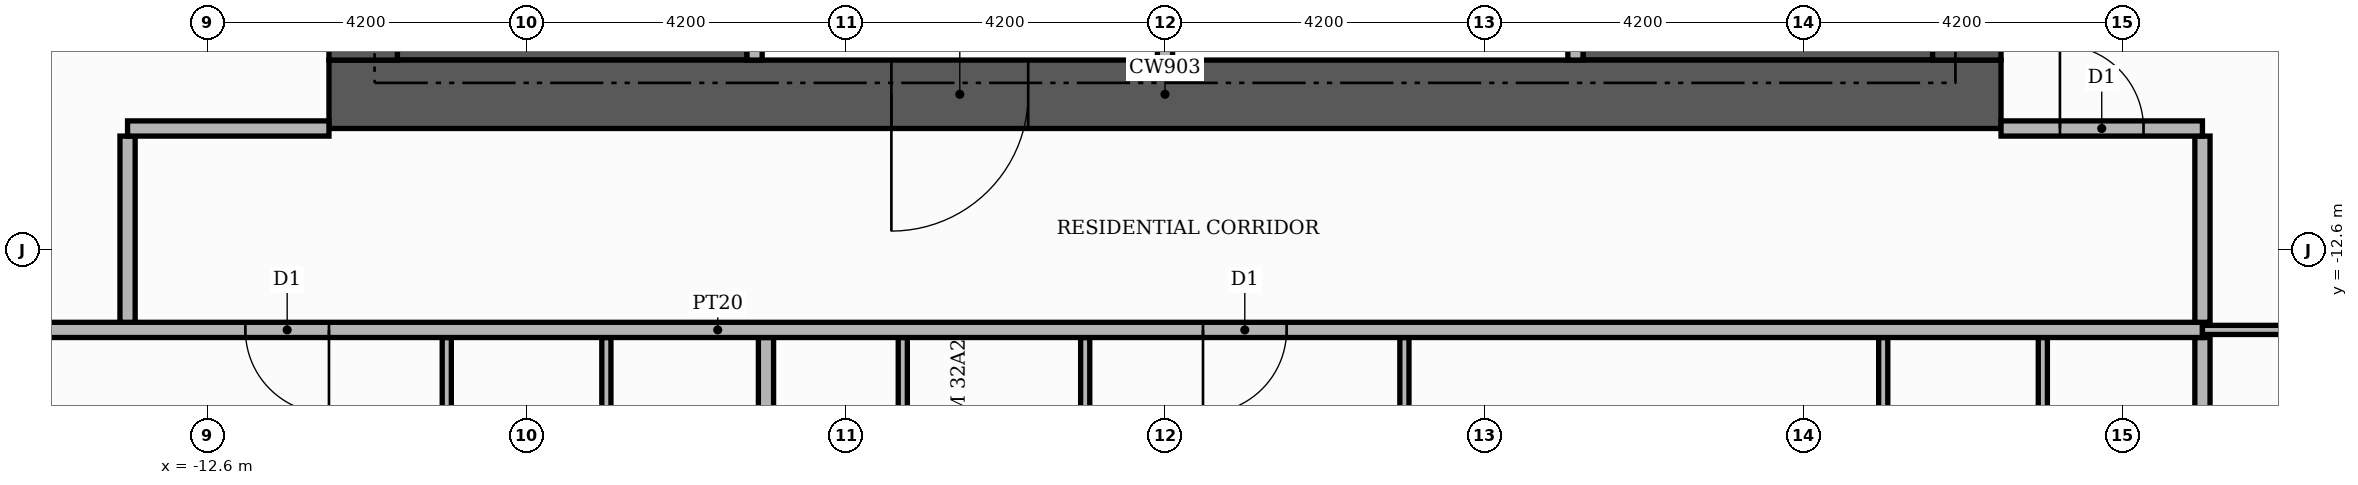
"""IFC4 building model, lengths in metres.
Left out: names, types, materials, properties, quantities, classifications, styles, units other than length and angle.
Written with IfcOpenShell. Run it as: python <this file> out.ifc"""

import sys

from ifc_helpers import new_model, si_unit, direction, frame, frame_2d, origin, place, context, subcontext, project, spatial, rectangle, extrude, element, fill, save


model = new_model("IFC4")
c1 = context("Model", 3, precision=1e-05, world=origin(), true_north=direction((0.0, 1.0)))
c2 = subcontext(c1, "Body", "Model", "MODEL_VIEW")
j1 = project(units=[si_unit("LENGTHUNIT", "METRE"), si_unit("PLANEANGLEUNIT", "RADIAN")], contexts=[c1])
p1 = place(None, origin())
s1 = spatial("IfcSite", under=j1, at=p1, CompositionType="ELEMENT")
p2 = place(p1, origin())
s2 = spatial("IfcBuilding", under=s1, at=p2, CompositionType="ELEMENT")
p3 = place(p2, frame((0.0, 0.0, 137.7)))
s3 = spatial("IfcBuildingStorey", under=s2, at=p3, CompositionType="ELEMENT", Elevation=137.7)
for number, where, z_axis, x_axis in (
    (1, (-10.1, -9.15, 0.0), (0.0, 0.0, 1.0), (1.0, 0.0, 0.0)),
    (2, (5.5, -9.15, 0.0), (0.0, 0.0, 1.0), (1.0, 0.0, 0.0)),
):
    element("IfcWall", number, at=place(p3, frame(where, z_axis=z_axis, x_axis=x_axis)), inside=s3, PredefinedType="SHEAR", context=c2, shape_type="SweptSolid", body=[
        extrude(rectangle(XDim=4.6, YDim=1.9, at=frame_2d((2.3, 0.0))), origin(), (0.0, 0.0, 1.0), 3.48),
    ])
p4 = place(p3, frame((-11.0, -10.55, 0.0), z_axis=(0.0, 0.0, 1.0), x_axis=(1.0, 0.0, 0.0)))
e3 = element("IfcWall", 3, at=p4, inside=s3, PredefinedType="SHEAR", context=c2, shape_type="SweptSolid", body=[
    extrude(rectangle(XDim=22.0, YDim=0.9, at=frame_2d((11.0, 0.0))), origin(), (0.0, 0.0, 1.0), 3.48),
])
p5 = place(p4, frame((7.4, 0.0, 0.0)))
e4 = element("IfcOpeningElement", 4, at=p5, cuts=e3, PredefinedType="OPENING", context=c2, shape_type="SweptSolid", body=[
    extrude(rectangle(XDim=1.8, YDim=2.2, at=frame_2d((0.9, 1.1))), frame((0.0, 0.46, 0.0), z_axis=(0.0, -1.0, 0.0), x_axis=(1.0, 0.0, 0.0)), (0.0, 0.0, 1.0), 0.92),
])
for number, where, z_axis, x_axis in (
    (5, (-10.55, -10.1, 0.0), (0.0, 0.0, 1.0), (0.0, 1.0, 0.0)),
    (6, (10.55, -10.1, 0.0), (0.0, 0.0, 1.0), (0.0, 1.0, 0.0)),
):
    element("IfcWall", number, at=place(p3, frame(where, z_axis=z_axis, x_axis=x_axis)), inside=s3, PredefinedType="SHEAR", context=c2, shape_type="SweptSolid", body=[
        extrude(rectangle(XDim=20.2, YDim=0.9, at=frame_2d((10.1, 0.0))), origin(), (0.0, 0.0, 1.0), 3.48),
    ])
p6 = place(p3, frame((-5.4, -10.1, 0.0), z_axis=(0.0, 0.0, 1.0), x_axis=(0.0, 1.0, 0.0)))
e7 = element("IfcWall", 7, at=p6, inside=s3, PredefinedType="PARTITIONING", context=c2, shape_type="SweptSolid", body=[
    extrude(rectangle(XDim=4.6, YDim=0.2, at=frame_2d((2.3, 0.0))), origin(), (0.0, 0.0, 1.0), 3.48),
])
p7 = place(p6, frame((2.9, 0.0, 0.0)))
e8 = element("IfcOpeningElement", 8, at=p7, cuts=e7, PredefinedType="OPENING", context=c2, shape_type="SweptSolid", body=[
    extrude(rectangle(XDim=1.0, YDim=2.1, at=frame_2d((0.5, 1.05))), frame((0.0, 0.11, 0.0), z_axis=(0.0, -1.0, 0.0), x_axis=(1.0, 0.0, 0.0)), (0.0, 0.0, 1.0), 0.22),
])
p8 = place(p3, frame((0.0, -10.1, 0.0), z_axis=(0.0, 0.0, 1.0), x_axis=(0.0, 1.0, 0.0)))
e9 = element("IfcWall", 9, at=p8, inside=s3, PredefinedType="PARTITIONING", context=c2, shape_type="SweptSolid", body=[
    extrude(rectangle(XDim=2.2, YDim=0.2, at=frame_2d((1.1, 0.0))), origin(), (0.0, 0.0, 1.0), 3.48),
])
p9 = place(p3, frame((5.4, -10.1, 0.0), z_axis=(0.0, 0.0, 1.0), x_axis=(0.0, 1.0, 0.0)))
e10 = element("IfcWall", 10, at=p9, inside=s3, PredefinedType="PARTITIONING", context=c2, shape_type="SweptSolid", body=[
    extrude(rectangle(XDim=4.6, YDim=0.2, at=frame_2d((2.3, 0.0))), origin(), (0.0, 0.0, 1.0), 3.48),
])
p10 = place(p9, frame((2.9, 0.0, 0.0)))
e11 = element("IfcOpeningElement", 11, at=p10, cuts=e10, PredefinedType="OPENING", context=c2, shape_type="SweptSolid", body=[
    extrude(rectangle(XDim=1.0, YDim=2.1, at=frame_2d((0.5, 1.05))), frame((0.0, 0.11, 0.0), z_axis=(0.0, -1.0, 0.0), x_axis=(1.0, 0.0, 0.0)), (0.0, 0.0, 1.0), 0.22),
])
for number, where, z_axis, x_axis in (
    (12, (-5.25, -25.42, 0.0), (0.0, 0.0, 1.0), (0.0, 1.0, 0.0)),
    (13, (13.65, -25.42, 0.0), (0.0, 0.0, 1.0), (0.0, 1.0, 0.0)),
):
    element("IfcWall", number, at=place(p3, frame(where, z_axis=z_axis, x_axis=x_axis)), inside=s3, PredefinedType="PARTITIONING", context=c2, shape_type="SweptSolid", body=[
        extrude(rectangle(XDim=11.67, YDim=0.2, at=frame_2d((5.835, 0.0))), origin(), (0.0, 0.0, 1.0), 3.48),
    ])
p11 = place(p3, frame((-3.45, -18.56, 0.0), z_axis=(0.0, 0.0, 1.0), x_axis=(0.0, 1.0, 0.0)))
e14 = element("IfcWall", 14, at=p11, inside=s3, PredefinedType="PARTITIONING", context=c2, shape_type="SweptSolid", body=[
    extrude(rectangle(XDim=4.81, YDim=0.12, at=frame_2d((2.405, 0.0))), origin(), (0.0, 0.0, 1.0), 3.48),
])
p12 = place(p3, frame((-1.05, -18.56, 0.0), z_axis=(0.0, 0.0, 1.0), x_axis=(0.0, 1.0, 0.0)))
e15 = element("IfcWall", 15, at=p12, inside=s3, PredefinedType="PARTITIONING", context=c2, shape_type="SweptSolid", body=[
    extrude(rectangle(XDim=4.81, YDim=0.12, at=frame_2d((2.405, 0.0))), origin(), (0.0, 0.0, 1.0), 3.48),
])
p13 = place(p12, frame((1.975, 0.0, 0.0)))
e16 = element("IfcOpeningElement", 16, at=p13, cuts=e15, PredefinedType="OPENING", context=c2, shape_type="SweptSolid", body=[
    extrude(rectangle(XDim=0.9, YDim=2.1, at=frame_2d((0.45, 1.05))), frame((0.0, 0.07, 0.0), z_axis=(0.0, -1.0, 0.0), x_axis=(1.0, 0.0, 0.0)), (0.0, 0.0, 1.0), 0.14),
])
for number, where, z_axis, x_axis in (
    (17, (3.15, -18.56, 0.0), (0.0, 0.0, 1.0), (0.0, 1.0, 0.0)),
    (18, (9.45, -18.56, 0.0), (0.0, 0.0, 1.0), (0.0, 1.0, 0.0)),
    (19, (11.55, -18.56, 0.0), (0.0, 0.0, 1.0), (0.0, 1.0, 0.0)),
):
    element("IfcWall", number, at=place(p3, frame(where, z_axis=z_axis, x_axis=x_axis)), inside=s3, PredefinedType="PARTITIONING", context=c2, shape_type="SweptSolid", body=[
        extrude(rectangle(XDim=4.81, YDim=0.12, at=frame_2d((2.405, 0.0))), origin(), (0.0, 0.0, 1.0), 3.48),
    ])
p14 = place(p3, frame((-9.45, -18.26, 0.0), z_axis=(0.0, 0.0, 1.0), x_axis=(0.0, 1.0, 0.0)))
e20 = element("IfcWall", 20, at=p14, inside=s3, PredefinedType="PARTITIONING", context=c2, shape_type="SweptSolid", body=[
    extrude(rectangle(XDim=4.51, YDim=0.12, at=frame_2d((2.255, 0.0))), origin(), (0.0, 0.0, 1.0), 3.48),
])
p15 = place(p14, frame((1.825, 0.0, 0.0)))
e21 = element("IfcOpeningElement", 21, at=p15, cuts=e20, PredefinedType="OPENING", context=c2, shape_type="SweptSolid", body=[
    extrude(rectangle(XDim=0.9, YDim=2.1, at=frame_2d((0.45, 1.05))), frame((0.0, 0.07, 0.0), z_axis=(0.0, -1.0, 0.0), x_axis=(1.0, 0.0, 0.0)), (0.0, 0.0, 1.0), 0.14),
])
p16 = place(p3, frame((-7.35, -18.26, 0.0), z_axis=(0.0, 0.0, 1.0), x_axis=(0.0, 1.0, 0.0)))
e22 = element("IfcWall", 22, at=p16, inside=s3, PredefinedType="PARTITIONING", context=c2, shape_type="SweptSolid", body=[
    extrude(rectangle(XDim=4.51, YDim=0.12, at=frame_2d((2.255, 0.0))), origin(), (0.0, 0.0, 1.0), 3.48),
])
p17 = place(p3, frame((-25.42, -13.65, 0.0), z_axis=(0.0, 0.0, 1.0), x_axis=(1.0, 0.0, 0.0)))
e23 = element("IfcWall", 23, at=p17, inside=s3, PredefinedType="PARTITIONING", context=c2, shape_type="SweptSolid", body=[
    extrude(rectangle(XDim=39.07, YDim=0.2, at=frame_2d((19.535, 0.0))), origin(), (0.0, 0.0, 1.0), 3.48),
])
p18 = place(p17, frame((13.32, 0.0, 0.0)))
e24 = element("IfcOpeningElement", 24, at=p18, cuts=e23, PredefinedType="OPENING", context=c2, shape_type="SweptSolid", body=[
    extrude(rectangle(XDim=1.1, YDim=2.4, at=frame_2d((0.55, 1.2))), frame((0.0, 0.11, 0.0), z_axis=(0.0, -1.0, 0.0), x_axis=(1.0, 0.0, 0.0)), (0.0, 0.0, 1.0), 0.22),
])
p19 = place(p17, frame((25.92, 0.0, 0.0)))
e25 = element("IfcOpeningElement", 25, at=p19, cuts=e23, PredefinedType="OPENING", context=c2, shape_type="SweptSolid", body=[
    extrude(rectangle(XDim=1.1, YDim=2.4, at=frame_2d((0.55, 1.2))), frame((0.0, 0.11, 0.0), z_axis=(0.0, -1.0, 0.0), x_axis=(1.0, 0.0, 0.0)), (0.0, 0.0, 1.0), 0.22),
])
p20 = place(p3, frame((13.65, -13.65, 0.0), z_axis=(0.0, 0.0, 1.0), x_axis=(1.0, 0.0, 0.0)))
e26 = element("IfcWall", 26, at=p20, inside=s3, PredefinedType="PARTITIONING", context=c2, shape_type="SweptSolid", body=[
    extrude(rectangle(XDim=7.07, YDim=0.12, at=frame_2d((3.535, 0.0))), origin(), (0.0, 0.0, 1.0), 3.48),
])
p21 = place(p20, frame((3.085, 0.0, 0.0)))
e27 = element("IfcOpeningElement", 27, at=p21, cuts=e26, PredefinedType="OPENING", context=c2, shape_type="SweptSolid", body=[
    extrude(rectangle(XDim=0.9, YDim=2.1, at=frame_2d((0.45, 1.05))), frame((0.0, 0.07, 0.0), z_axis=(0.0, -1.0, 0.0), x_axis=(1.0, 0.0, 0.0)), (0.0, 0.0, 1.0), 0.14),
])
for number, where, z_axis, x_axis in (
    (28, (-13.65, -13.55, 0.0), (0.0, 0.0, 1.0), (0.0, 1.0, 0.0)),
    (29, (13.65, -13.55, 0.0), (0.0, 0.0, 1.0), (0.0, 1.0, 0.0)),
):
    element("IfcWall", number, at=place(p3, frame(where, z_axis=z_axis, x_axis=x_axis)), inside=s3, PredefinedType="PARTITIONING", context=c2, shape_type="SweptSolid", body=[
        extrude(rectangle(XDim=2.45, YDim=0.2, at=frame_2d((1.225, 0.0))), origin(), (0.0, 0.0, 1.0), 3.48),
    ])
p22 = place(p3, frame((-13.65, -11.0, 0.0), z_axis=(0.0, 0.0, 1.0), x_axis=(1.0, 0.0, 0.0)))
e30 = element("IfcWall", 30, at=p22, inside=s3, PredefinedType="PARTITIONING", context=c2, shape_type="SweptSolid", body=[
    extrude(rectangle(XDim=2.65, YDim=0.2, at=frame_2d((1.325, 0.0))), origin(), (0.0, 0.0, 1.0), 3.48),
])
p23 = place(p3, frame((11.0, -11.0, 0.0), z_axis=(0.0, 0.0, 1.0), x_axis=(1.0, 0.0, 0.0)))
e31 = element("IfcWall", 31, at=p23, inside=s3, PredefinedType="PARTITIONING", context=c2, shape_type="SweptSolid", body=[
    extrude(rectangle(XDim=2.65, YDim=0.2, at=frame_2d((1.325, 0.0))), origin(), (0.0, 0.0, 1.0), 3.48),
])
p24 = place(p23, frame((0.775, 0.0, 0.0)))
e32 = element("IfcOpeningElement", 32, at=p24, cuts=e31, PredefinedType="OPENING", context=c2, shape_type="SweptSolid", body=[
    extrude(rectangle(XDim=1.1, YDim=2.4, at=frame_2d((0.55, 1.2))), frame((0.0, 0.11, 0.0), z_axis=(0.0, -1.0, 0.0), x_axis=(1.0, 0.0, 0.0)), (0.0, 0.0, 1.0), 0.22),
])
p25 = place(p5, frame((1.8, 0.0, 0.0), z_axis=(0.0, 0.0, 1.0), x_axis=(-1.0, 0.0, 0.0)))
e33 = element("IfcDoor", 33, at=p25, inside=s3, OperationType="DOUBLE_DOOR_SINGLE_SWING", PredefinedType="DOOR", context=c2, shape_type="SweptSolid", body=[
    extrude(rectangle(XDim=1.8, YDim=2.2, at=frame_2d((0.9, 1.1))), frame((0.0, 0.025, 0.0), z_axis=(0.0, -1.0, 0.0), x_axis=(1.0, 0.0, 0.0)), (0.0, 0.0, 1.0), 0.05),
])
fill(e4, e33)
p26 = place(p18, frame((1.1, 0.0, 0.0), z_axis=(0.0, 0.0, 1.0), x_axis=(-1.0, 0.0, 0.0)))
e34 = element("IfcDoor", 34, at=p26, inside=s3, OperationType="SINGLE_SWING_RIGHT", PredefinedType="DOOR", context=c2, shape_type="SweptSolid", body=[
    extrude(rectangle(XDim=1.1, YDim=2.4, at=frame_2d((0.55, 1.2))), frame((0.0, 0.025, 0.0), z_axis=(0.0, -1.0, 0.0), x_axis=(1.0, 0.0, 0.0)), (0.0, 0.0, 1.0), 0.05),
])
fill(e24, e34)
p27 = place(p19, frame((1.1, 0.0, 0.0), z_axis=(0.0, 0.0, 1.0), x_axis=(-1.0, 0.0, 0.0)))
e35 = element("IfcDoor", 35, at=p27, inside=s3, OperationType="SINGLE_SWING_LEFT", PredefinedType="DOOR", context=c2, shape_type="SweptSolid", body=[
    extrude(rectangle(XDim=1.1, YDim=2.4, at=frame_2d((0.55, 1.2))), frame((0.0, 0.025, 0.0), z_axis=(0.0, -1.0, 0.0), x_axis=(1.0, 0.0, 0.0)), (0.0, 0.0, 1.0), 0.05),
])
fill(e25, e35)
p28 = place(p24, origin())
e36 = element("IfcDoor", 36, at=p28, inside=s3, OperationType="SINGLE_SWING_LEFT", PredefinedType="DOOR", context=c2, shape_type="SweptSolid", body=[
    extrude(rectangle(XDim=1.1, YDim=2.4, at=frame_2d((0.55, 1.2))), frame((0.0, 0.025, 0.0), z_axis=(0.0, -1.0, 0.0), x_axis=(1.0, 0.0, 0.0)), (0.0, 0.0, 1.0), 0.05),
])
fill(e32, e36)
save(model, sys.argv[1])
